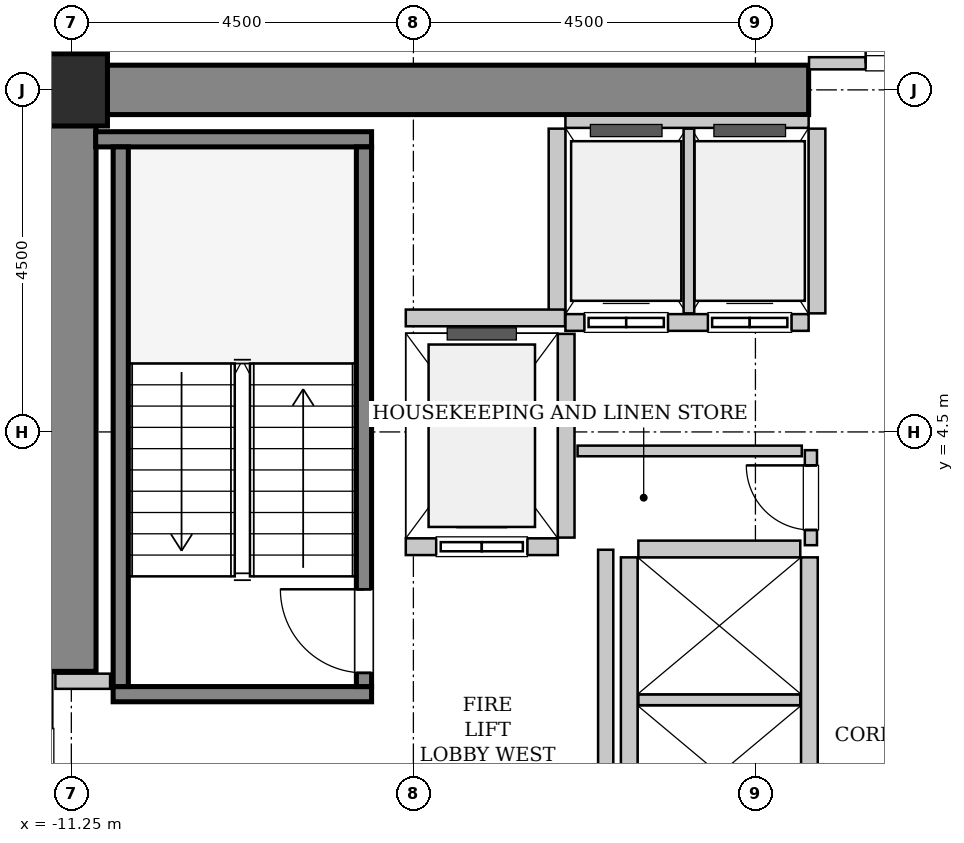
"""IFC4 building model, lengths in metres.
Left out: names, types, materials, properties, quantities, classifications, styles, units other than length and angle.
Written with IfcOpenShell. Run it as: python <this file> out.ifc"""

import sys

from ifc_helpers import new_model, si_unit, direction, frame, frame_2d, origin, origin_2d, place, context, subcontext, project, spatial, rectangle, hollow_rectangle, extrude, source, transform, mapped, element, fill, save


model = new_model("IFC4")
c1 = context("Model", 3, precision=1e-05, world=origin(), true_north=direction((0.0, 1.0)))
c2 = subcontext(c1, "Body", "Model", "MODEL_VIEW")
j1 = project(units=[si_unit("LENGTHUNIT", "METRE"), si_unit("PLANEANGLEUNIT", "RADIAN")], contexts=[c1])
p1 = place(None, origin())
s1 = spatial("IfcSite", under=j1, at=p1, CompositionType="ELEMENT")
p2 = place(p1, origin())
s2 = spatial("IfcBuilding", under=s1, at=p2, CompositionType="ELEMENT")
p3 = place(p2, frame((0.0, 0.0, 78.6)))
s3 = spatial("IfcBuildingStorey", under=s2, at=p3, CompositionType="ELEMENT", Elevation=78.6)
m1 = source(origin(), c2, "Body", "SweptSolid", [
    extrude(rectangle(XDim=10.025, YDim=0.65, at=frame_2d((5.012, 0.0))), origin(), (0.0, 0.0, 1.0), 3.8),
])
p4 = place(p3, frame((-11.575, 9.0, 0.0), z_axis=(0.0, 0.0, 1.0), x_axis=(1.0, 0.0, 0.0)))
e1 = element("IfcWall", 1, at=p4, inside=s3, PredefinedType="SHEAR", context=c2, shape_type="MappedRepresentation", body=[
    mapped(m1, transform((0.0, 0.0, 0.0), x_axis=(1.0, 0.0, 0.0), y_axis=(0.0, 1.0, 0.0), z_axis=(0.0, 0.0, 1.0), scale=1.0)),
])
m2 = source(origin(), c2, "Body", "SweptSolid", [
    extrude(rectangle(XDim=7.325, YDim=0.65, at=frame_2d((3.663, 0.0))), origin(), (0.0, 0.0, 1.0), 3.8),
])
p5 = place(p3, frame((-11.25, 1.35, 0.0), z_axis=(0.0, 0.0, 1.0), x_axis=(0.0, 1.0, 0.0)))
e2 = element("IfcWall", 2, at=p5, inside=s3, PredefinedType="SHEAR", context=c2, shape_type="MappedRepresentation", body=[
    mapped(m2, transform((0.0, 0.0, 0.0), x_axis=(1.0, 0.0, 0.0), y_axis=(0.0, 1.0, 0.0), z_axis=(0.0, 0.0, 1.0), scale=1.0)),
])
m3 = source(origin(), c2, "Body", "SweptSolid", [
    extrude(hollow_rectangle(XDim=0.95, YDim=0.95, WallThickness=0.045, InnerFilletRadius=0.045, OuterFilletRadius=0.09, at=origin_2d()), origin(), (0.0, 0.0, 1.0), 3.8),
])
p6 = place(p3, frame((-11.25, 9.0, 0.0), z_axis=(0.0, 0.0, 1.0), x_axis=(1.0, 0.0, 0.0)))
e3 = element("IfcColumn", 3, at=p6, inside=s3, PredefinedType="COLUMN", context=c2, shape_type="MappedRepresentation", body=[
    mapped(m3, transform((0.0, 0.0, 0.0), x_axis=(1.0, 0.0, 0.0), y_axis=(0.0, 1.0, 0.0), z_axis=(0.0, 0.0, 1.0), scale=1.0)),
])
m4 = source(origin(), c2, "Body", "SweptSolid", [
    extrude(rectangle(XDim=3.4, YDim=0.2, at=frame_2d((1.7, 0.0))), origin(), (0.0, 0.0, 1.0), 3.8),
])
p7 = place(p3, frame((-7.3, 1.05, 0.0), z_axis=(0.0, 0.0, 1.0), x_axis=(-1.0, 0.0, 0.0)))
e4 = element("IfcWall", 4, at=p7, inside=s3, PredefinedType="SOLIDWALL", context=c2, shape_type="MappedRepresentation", body=[
    mapped(m4, transform((0.0, 0.0, 0.0), x_axis=(1.0, 0.0, 0.0), y_axis=(0.0, 1.0, 0.0), z_axis=(0.0, 0.0, 1.0), scale=1.0)),
])
m5 = source(origin(), c2, "Body", "SweptSolid", [
    extrude(rectangle(XDim=3.63, YDim=0.2, at=frame_2d((1.815, 0.0))), origin(), (0.0, 0.0, 1.0), 3.8),
])
p8 = place(p3, frame((-7.3, 8.35, 0.0), z_axis=(0.0, 0.0, 1.0), x_axis=(-1.0, 0.0, 0.0)))
e5 = element("IfcWall", 5, at=p8, inside=s3, PredefinedType="SOLIDWALL", context=c2, shape_type="MappedRepresentation", body=[
    mapped(m5, transform((0.0, 0.0, 0.0), x_axis=(1.0, 0.0, 0.0), y_axis=(0.0, 1.0, 0.0), z_axis=(0.0, 0.0, 1.0), scale=1.0)),
])
m6 = source(origin(), c2, "Body", "SweptSolid", [
    extrude(rectangle(XDim=7.1, YDim=0.2, at=frame_2d((3.55, 0.0))), origin(), (0.0, 0.0, 1.0), 3.8),
])
p9 = place(p3, frame((-7.4, 1.15, 0.0), z_axis=(0.0, 0.0, 1.0), x_axis=(0.0, 1.0, 0.0)))
e6 = element("IfcWall", 6, at=p9, inside=s3, PredefinedType="SOLIDWALL", context=c2, shape_type="MappedRepresentation", body=[
    mapped(m6, transform((0.0, 0.0, 0.0), x_axis=(1.0, 0.0, 0.0), y_axis=(0.0, 1.0, 0.0), z_axis=(0.0, 0.0, 1.0), scale=1.0)),
])
p10 = place(p9, frame((0.18, 0.0, 0.0)))
e7 = element("IfcOpeningElement", 7, at=p10, cuts=e6, PredefinedType="OPENING", context=c2, shape_type="SweptSolid", body=[
    extrude(rectangle(XDim=1.1, YDim=2.15, at=frame_2d((0.55, 1.075))), frame((0.0, 0.11, 0.0), z_axis=(0.0, -1.0, 0.0), x_axis=(1.0, 0.0, 0.0)), (0.0, 0.0, 1.0), 0.22),
])
p11 = place(p3, frame((-10.6, 1.15, 0.0), z_axis=(0.0, 0.0, 1.0), x_axis=(0.0, 1.0, 0.0)))
e8 = element("IfcWall", 8, at=p11, inside=s3, PredefinedType="SOLIDWALL", context=c2, shape_type="MappedRepresentation", body=[
    mapped(m6, transform((0.0, 0.0, 0.0), x_axis=(1.0, 0.0, 0.0), y_axis=(0.0, 1.0, 0.0), z_axis=(0.0, 0.0, 1.0), scale=1.0)),
])
m7 = source(origin(), c2, "Body", "SweptSolid", [
    extrude(rectangle(XDim=2.0, YDim=0.22, at=frame_2d((1.0, 0.0))), origin(), (0.0, 0.0, 1.0), 3.535),
])
p12 = place(p3, frame((-6.85, 2.99, 0.0), z_axis=(0.0, 0.0, 1.0), x_axis=(1.0, 0.0, 0.0)))
e9 = element("IfcWall", 9, at=p12, inside=s3, PredefinedType="SOLIDWALL", context=c2, shape_type="MappedRepresentation", body=[
    mapped(m7, transform((0.0, 0.0, 0.0), x_axis=(1.0, 0.0, 0.0), y_axis=(0.0, 1.0, 0.0), z_axis=(0.0, 0.0, 1.0), scale=1.0)),
])
p13 = place(p12, frame((0.4, 0.0, 0.0)))
e10 = element("IfcOpeningElement", 10, at=p13, cuts=e9, PredefinedType="OPENING", context=c2, shape_type="SweptSolid", body=[
    extrude(rectangle(XDim=1.2, YDim=2.2, at=frame_2d((0.6, 1.1))), frame((0.0, 0.12, 0.0), z_axis=(0.0, -1.0, 0.0), x_axis=(1.0, 0.0, 0.0)), (0.0, 0.0, 1.0), 0.24),
])
m8 = source(origin(), c2, "Body", "SweptSolid", [
    extrude(rectangle(XDim=2.68, YDim=0.22, at=frame_2d((1.34, 0.0))), origin(), (0.0, 0.0, 1.0), 3.535),
])
p14 = place(p3, frame((-4.74, 3.11, 0.0), z_axis=(0.0, 0.0, 1.0), x_axis=(0.0, 1.0, 0.0)))
e11 = element("IfcWall", 11, at=p14, inside=s3, PredefinedType="SOLIDWALL", context=c2, shape_type="MappedRepresentation", body=[
    mapped(m8, transform((0.0, 0.0, 0.0), x_axis=(1.0, 0.0, 0.0), y_axis=(0.0, 1.0, 0.0), z_axis=(0.0, 0.0, 1.0), scale=1.0)),
])
m9 = source(origin(), c2, "Body", "SweptSolid", [
    extrude(rectangle(XDim=3.2, YDim=0.22, at=frame_2d((1.6, 0.0))), origin(), (0.0, 0.0, 1.0), 3.535),
])
p15 = place(p3, frame((-4.75, 5.94, 0.0), z_axis=(0.0, 0.0, 1.0), x_axis=(1.0, 0.0, 0.0)))
e12 = element("IfcWall", 12, at=p15, inside=s3, PredefinedType="SOLIDWALL", context=c2, shape_type="MappedRepresentation", body=[
    mapped(m9, transform((0.0, 0.0, 0.0), x_axis=(1.0, 0.0, 0.0), y_axis=(0.0, 1.0, 0.0), z_axis=(0.0, 0.0, 1.0), scale=1.0)),
])
p16 = place(p15, frame((0.25, 0.0, 0.0)))
e13 = element("IfcOpeningElement", 13, at=p16, cuts=e12, PredefinedType="OPENING", context=c2, shape_type="SweptSolid", body=[
    extrude(rectangle(XDim=1.1, YDim=2.2, at=frame_2d((0.55, 1.1))), frame((0.0, 0.12, 0.0), z_axis=(0.0, -1.0, 0.0), x_axis=(1.0, 0.0, 0.0)), (0.0, 0.0, 1.0), 0.24),
])
p17 = place(p15, frame((1.875, 0.0, 0.0)))
e14 = element("IfcOpeningElement", 14, at=p17, cuts=e12, PredefinedType="OPENING", context=c2, shape_type="SweptSolid", body=[
    extrude(rectangle(XDim=1.1, YDim=2.2, at=frame_2d((0.55, 1.1))), frame((0.0, 0.12, 0.0), z_axis=(0.0, -1.0, 0.0), x_axis=(1.0, 0.0, 0.0)), (0.0, 0.0, 1.0), 0.24),
])
m10 = source(origin(), c2, "Body", "SweptSolid", [
    extrude(rectangle(XDim=3.2, YDim=0.16, at=frame_2d((1.6, 0.0))), origin(), (0.0, 0.0, 1.0), 2.425),
])
p18 = place(p3, frame((-1.55, 8.58, 0.0), z_axis=(0.0, 0.0, 1.0), x_axis=(-1.0, 0.0, 0.0)))
e15 = element("IfcWall", 15, at=p18, inside=s3, PredefinedType="PARTITIONING", context=c2, shape_type="MappedRepresentation", body=[
    mapped(m10, transform((0.0, 0.0, 0.0), x_axis=(1.0, 0.0, 0.0), y_axis=(0.0, 1.0, 0.0), z_axis=(0.0, 0.0, 1.0), scale=1.0)),
])
m11 = source(origin(), c2, "Body", "SweptSolid", [
    extrude(rectangle(XDim=2.43, YDim=0.22, at=frame_2d((1.215, 0.0))), origin(), (0.0, 0.0, 1.0), 3.535),
])
p19 = place(p3, frame((-4.86, 8.49, 0.0), z_axis=(0.0, 0.0, 1.0), x_axis=(0.0, -1.0, 0.0)))
e16 = element("IfcWall", 16, at=p19, inside=s3, PredefinedType="SOLIDWALL", context=c2, shape_type="MappedRepresentation", body=[
    mapped(m11, transform((0.0, 0.0, 0.0), x_axis=(1.0, 0.0, 0.0), y_axis=(0.0, 1.0, 0.0), z_axis=(0.0, 0.0, 1.0), scale=1.0)),
])
m12 = source(origin(), c2, "Body", "SweptSolid", [
    extrude(rectangle(XDim=2.43, YDim=0.14, at=frame_2d((1.215, 0.0))), origin(), (0.0, 0.0, 1.0), 3.535),
])
p20 = place(p3, frame((-3.125, 6.06, 0.0), z_axis=(0.0, 0.0, 1.0), x_axis=(0.0, 1.0, 0.0)))
e17 = element("IfcWall", 17, at=p20, inside=s3, PredefinedType="PARTITIONING", context=c2, shape_type="MappedRepresentation", body=[
    mapped(m12, transform((0.0, 0.0, 0.0), x_axis=(1.0, 0.0, 0.0), y_axis=(0.0, 1.0, 0.0), z_axis=(0.0, 0.0, 1.0), scale=1.0)),
])
p21 = place(p3, frame((-1.44, 6.06, 0.0), z_axis=(0.0, 0.0, 1.0), x_axis=(0.0, 1.0, 0.0)))
e18 = element("IfcWall", 18, at=p21, inside=s3, PredefinedType="SOLIDWALL", context=c2, shape_type="MappedRepresentation", body=[
    mapped(m11, transform((0.0, 0.0, 0.0), x_axis=(1.0, 0.0, 0.0), y_axis=(0.0, 1.0, 0.0), z_axis=(0.0, 0.0, 1.0), scale=1.0)),
])
m13 = source(origin(), c2, "Body", "SweptSolid", [
    extrude(rectangle(XDim=5.7, YDim=0.22, at=frame_2d((2.85, 0.0))), origin(), (0.0, 0.0, 1.0), 3.535),
])
for number, where, z_axis, x_axis in (
    (19, (-1.54, -2.85, 0.0), (0.0, 0.0, 1.0), (0.0, 1.0, 0.0)),
    (20, (-3.91, 2.85, 0.0), (0.0, 0.0, 1.0), (0.0, -1.0, 0.0)),
):
    element("IfcWall", number, at=place(p3, frame(where, z_axis=z_axis, x_axis=x_axis)), inside=s3, PredefinedType="SOLIDWALL", context=c2, shape_type="MappedRepresentation", body=[
        mapped(m13, transform((0.0, 0.0, 0.0), x_axis=(1.0, 0.0, 0.0), y_axis=(0.0, 1.0, 0.0), z_axis=(0.0, 0.0, 1.0), scale=1.0)),
    ])
m14 = source(origin(), c2, "Body", "SweptSolid", [
    extrude(rectangle(XDim=2.13, YDim=0.14, at=frame_2d((1.065, 0.0))), origin(), (0.0, 0.0, 1.0), 3.535),
])
p22 = place(p3, frame((-3.79, 0.975, 0.0), z_axis=(0.0, 0.0, 1.0), x_axis=(1.0, 0.0, 0.0)))
e21 = element("IfcWall", 21, at=p22, inside=s3, PredefinedType="PARTITIONING", context=c2, shape_type="MappedRepresentation", body=[
    mapped(m14, transform((0.0, 0.0, 0.0), x_axis=(1.0, 0.0, 0.0), y_axis=(0.0, 1.0, 0.0), z_axis=(0.0, 0.0, 1.0), scale=1.0)),
])
m15 = source(origin(), c2, "Body", "SweptSolid", [
    extrude(rectangle(XDim=2.13, YDim=0.22, at=frame_2d((1.065, 0.0))), origin(), (0.0, 0.0, 1.0), 3.535),
])
p23 = place(p3, frame((-1.66, 2.96, 0.0), z_axis=(0.0, 0.0, 1.0), x_axis=(-1.0, 0.0, 0.0)))
e22 = element("IfcWall", 22, at=p23, inside=s3, PredefinedType="SOLIDWALL", context=c2, shape_type="MappedRepresentation", body=[
    mapped(m15, transform((0.0, 0.0, 0.0), x_axis=(1.0, 0.0, 0.0), y_axis=(0.0, 1.0, 0.0), z_axis=(0.0, 0.0, 1.0), scale=1.0)),
])
m16 = source(origin(), c2, "Body", "SweptSolid", [
    extrude(rectangle(XDim=2.095, YDim=0.22, at=frame_2d((1.048, 0.0))), origin(), (0.0, 0.0, 1.0), 3.535),
])
p24 = place(p3, frame((-6.85, 6.0, 0.0), z_axis=(0.0, 0.0, 1.0), x_axis=(1.0, 0.0, 0.0)))
e23 = element("IfcWall", 23, at=p24, inside=s3, PredefinedType="SOLIDWALL", context=c2, shape_type="MappedRepresentation", body=[
    mapped(m16, transform((0.0, 0.0, 0.0), x_axis=(1.0, 0.0, 0.0), y_axis=(0.0, 1.0, 0.0), z_axis=(0.0, 0.0, 1.0), scale=1.0)),
])
m17 = source(origin(), c2, "Body", "SweptSolid", [
    extrude(rectangle(XDim=5.9, YDim=0.2, at=frame_2d((2.95, 0.0))), origin(), (0.0, 0.0, 1.0), 3.535),
])
p25 = place(p3, frame((-4.22, -2.95, 0.0), z_axis=(0.0, 0.0, 1.0), x_axis=(0.0, 1.0, 0.0)))
e24 = element("IfcWall", 24, at=p25, inside=s3, PredefinedType="PARTITIONING", context=c2, shape_type="MappedRepresentation", body=[
    mapped(m17, transform((0.0, 0.0, 0.0), x_axis=(1.0, 0.0, 0.0), y_axis=(0.0, 1.0, 0.0), z_axis=(0.0, 0.0, 1.0), scale=1.0)),
])
m18 = source(origin(), c2, "Body", "SweptSolid", [
    extrude(rectangle(XDim=0.72, YDim=0.2, at=frame_2d((0.36, 0.0))), origin(), (0.0, 0.0, 1.0), 3.535),
])
p26 = place(p3, frame((-11.46, 1.22, 0.0), z_axis=(0.0, 0.0, 1.0), x_axis=(1.0, 0.0, 0.0)))
e25 = element("IfcWall", 25, at=p26, inside=s3, PredefinedType="PARTITIONING", context=c2, shape_type="MappedRepresentation", body=[
    mapped(m18, transform((0.0, 0.0, 0.0), x_axis=(1.0, 0.0, 0.0), y_axis=(0.0, 1.0, 0.0), z_axis=(0.0, 0.0, 1.0), scale=1.0)),
])
m19 = source(origin(), c2, "Body", "SweptSolid", [
    extrude(rectangle(XDim=3.09, YDim=0.16, at=frame_2d((1.545, 0.0))), origin(), (0.0, 0.0, 1.0), 2.425),
])
p27 = place(p3, frame((-1.545, 9.35, 0.0), z_axis=(0.0, 0.0, 1.0), x_axis=(1.0, 0.0, 0.0)))
e26 = element("IfcWall", 26, at=p27, inside=s3, PredefinedType="PARTITIONING", context=c2, shape_type="MappedRepresentation", body=[
    mapped(m19, transform((0.0, 0.0, 0.0), x_axis=(1.0, 0.0, 0.0), y_axis=(0.0, 1.0, 0.0), z_axis=(0.0, 0.0, 1.0), scale=1.0)),
])
p28 = place(p27, frame((0.745, 0.0, 0.0)))
e27 = element("IfcOpeningElement", 27, at=p28, cuts=e26, PredefinedType="OPENING", context=c2, shape_type="SweptSolid", body=[
    extrude(rectangle(XDim=1.6, YDim=2.3, at=frame_2d((0.8, 1.15))), frame((0.0, 0.09, 0.0), z_axis=(0.0, -1.0, 0.0), x_axis=(1.0, 0.0, 0.0)), (0.0, 0.0, 1.0), 0.18),
])
m20 = source(origin(), c2, "Body", "SweptSolid", [
    extrude(rectangle(XDim=1.25, YDim=0.16, at=frame_2d((0.625, 0.0))), origin(), (0.0, 0.0, 1.0), 3.535),
])
p29 = place(p3, frame((-1.52, 3.01, 0.0), z_axis=(0.0, 0.0, 1.0), x_axis=(0.0, 1.0, 0.0)))
e28 = element("IfcWall", 28, at=p29, inside=s3, PredefinedType="PARTITIONING", context=c2, shape_type="MappedRepresentation", body=[
    mapped(m20, transform((0.0, 0.0, 0.0), x_axis=(1.0, 0.0, 0.0), y_axis=(0.0, 1.0, 0.0), z_axis=(0.0, 0.0, 1.0), scale=1.0)),
])
p30 = place(p29, frame((0.2, 0.0, 0.0)))
e29 = element("IfcOpeningElement", 29, at=p30, cuts=e28, PredefinedType="OPENING", context=c2, shape_type="SweptSolid", body=[
    extrude(rectangle(XDim=0.85, YDim=2.1, at=frame_2d((0.425, 1.05))), frame((0.0, 0.09, 0.0), z_axis=(0.0, -1.0, 0.0), x_axis=(1.0, 0.0, 0.0)), (0.0, 0.0, 1.0), 0.18),
])
m21 = source(origin(), c2, "Body", "SweptSolid", [
    extrude(rectangle(XDim=2.95, YDim=0.14, at=frame_2d((1.475, 0.0))), origin(), (0.0, 0.0, 1.0), 3.535),
])
p31 = place(p3, frame((-4.59, 4.25, 0.0), z_axis=(0.0, 0.0, 1.0), x_axis=(1.0, 0.0, 0.0)))
e30 = element("IfcWall", 30, at=p31, inside=s3, PredefinedType="PARTITIONING", context=c2, shape_type="MappedRepresentation", body=[
    mapped(m21, transform((0.0, 0.0, 0.0), x_axis=(1.0, 0.0, 0.0), y_axis=(0.0, 1.0, 0.0), z_axis=(0.0, 0.0, 1.0), scale=1.0)),
])
m22 = source(origin(), c2, "Body", "SweptSolid", [
    extrude(rectangle(XDim=1.1, YDim=2.15, at=frame_2d((0.55, 1.075))), frame((0.0, 0.025, 0.0), z_axis=(0.0, -1.0, 0.0), x_axis=(1.0, 0.0, 0.0)), (0.0, 0.0, 1.0), 0.05),
])
p32 = place(p10, origin())
e31 = element("IfcDoor", 31, at=p32, inside=s3, OperationType="SINGLE_SWING_RIGHT", PredefinedType="DOOR", context=c2, shape_type="MappedRepresentation", body=[
    mapped(m22, transform((0.0, 0.0, 0.0), x_axis=(1.0, 0.0, 0.0), y_axis=(0.0, 1.0, 0.0), z_axis=(0.0, 0.0, 1.0), scale=1.0)),
])
fill(e7, e31)
m23 = source(origin(), c2, "Body", "SweptSolid", [
    extrude(rectangle(XDim=1.2, YDim=2.2, at=frame_2d((0.6, 1.1))), frame((0.0, 0.025, 0.0), z_axis=(0.0, -1.0, 0.0), x_axis=(1.0, 0.0, 0.0)), (0.0, 0.0, 1.0), 0.05),
])
p33 = place(p13, origin())
e32 = element("IfcDoor", 32, at=p33, inside=s3, OperationType="SLIDING_TO_LEFT", PredefinedType="DOOR", context=c2, shape_type="MappedRepresentation", body=[
    mapped(m23, transform((0.0, 0.0, 0.0), x_axis=(1.0, 0.0, 0.0), y_axis=(0.0, 1.0, 0.0), z_axis=(0.0, 0.0, 1.0), scale=1.0)),
])
fill(e10, e32)
m24 = source(origin(), c2, "Body", "SweptSolid", [
    extrude(rectangle(XDim=1.1, YDim=2.2, at=frame_2d((0.55, 1.1))), frame((0.0, 0.025, 0.0), z_axis=(0.0, -1.0, 0.0), x_axis=(1.0, 0.0, 0.0)), (0.0, 0.0, 1.0), 0.05),
])
p34 = place(p16, origin())
e33 = element("IfcDoor", 33, at=p34, inside=s3, OperationType="DOUBLE_DOOR_SLIDING", PredefinedType="DOOR", context=c2, shape_type="MappedRepresentation", body=[
    mapped(m24, transform((0.0, 0.0, 0.0), x_axis=(1.0, 0.0, 0.0), y_axis=(0.0, 1.0, 0.0), z_axis=(0.0, 0.0, 1.0), scale=1.0)),
])
fill(e13, e33)
p35 = place(p17, origin())
e34 = element("IfcDoor", 34, at=p35, inside=s3, OperationType="DOUBLE_DOOR_SLIDING", PredefinedType="DOOR", context=c2, shape_type="MappedRepresentation", body=[
    mapped(m24, transform((0.0, 0.0, 0.0), x_axis=(1.0, 0.0, 0.0), y_axis=(0.0, 1.0, 0.0), z_axis=(0.0, 0.0, 1.0), scale=1.0)),
])
fill(e14, e34)
m25 = source(origin(), c2, "Body", "SweptSolid", [
    extrude(rectangle(XDim=1.6, YDim=2.3, at=frame_2d((0.8, 1.15))), frame((0.0, 0.025, 0.0), z_axis=(0.0, -1.0, 0.0), x_axis=(1.0, 0.0, 0.0)), (0.0, 0.0, 1.0), 0.05),
])
p36 = place(p28, origin())
e35 = element("IfcDoor", 35, at=p36, inside=s3, OperationType="DOUBLE_DOOR_SINGLE_SWING", PredefinedType="DOOR", context=c2, shape_type="MappedRepresentation", body=[
    mapped(m25, transform((0.0, 0.0, 0.0), x_axis=(1.0, 0.0, 0.0), y_axis=(0.0, 1.0, 0.0), z_axis=(0.0, 0.0, 1.0), scale=1.0)),
])
fill(e27, e35)
m26 = source(origin(), c2, "Body", "SweptSolid", [
    extrude(rectangle(XDim=0.85, YDim=2.1, at=frame_2d((0.425, 1.05))), frame((0.0, 0.025, 0.0), z_axis=(0.0, -1.0, 0.0), x_axis=(1.0, 0.0, 0.0)), (0.0, 0.0, 1.0), 0.05),
])
p37 = place(p30, origin())
e36 = element("IfcDoor", 36, at=p37, inside=s3, OperationType="SINGLE_SWING_RIGHT", PredefinedType="DOOR", context=c2, shape_type="MappedRepresentation", body=[
    mapped(m26, transform((0.0, 0.0, 0.0), x_axis=(1.0, 0.0, 0.0), y_axis=(0.0, 1.0, 0.0), z_axis=(0.0, 0.0, 1.0), scale=1.0)),
])
fill(e29, e36)
save(model, sys.argv[1])
